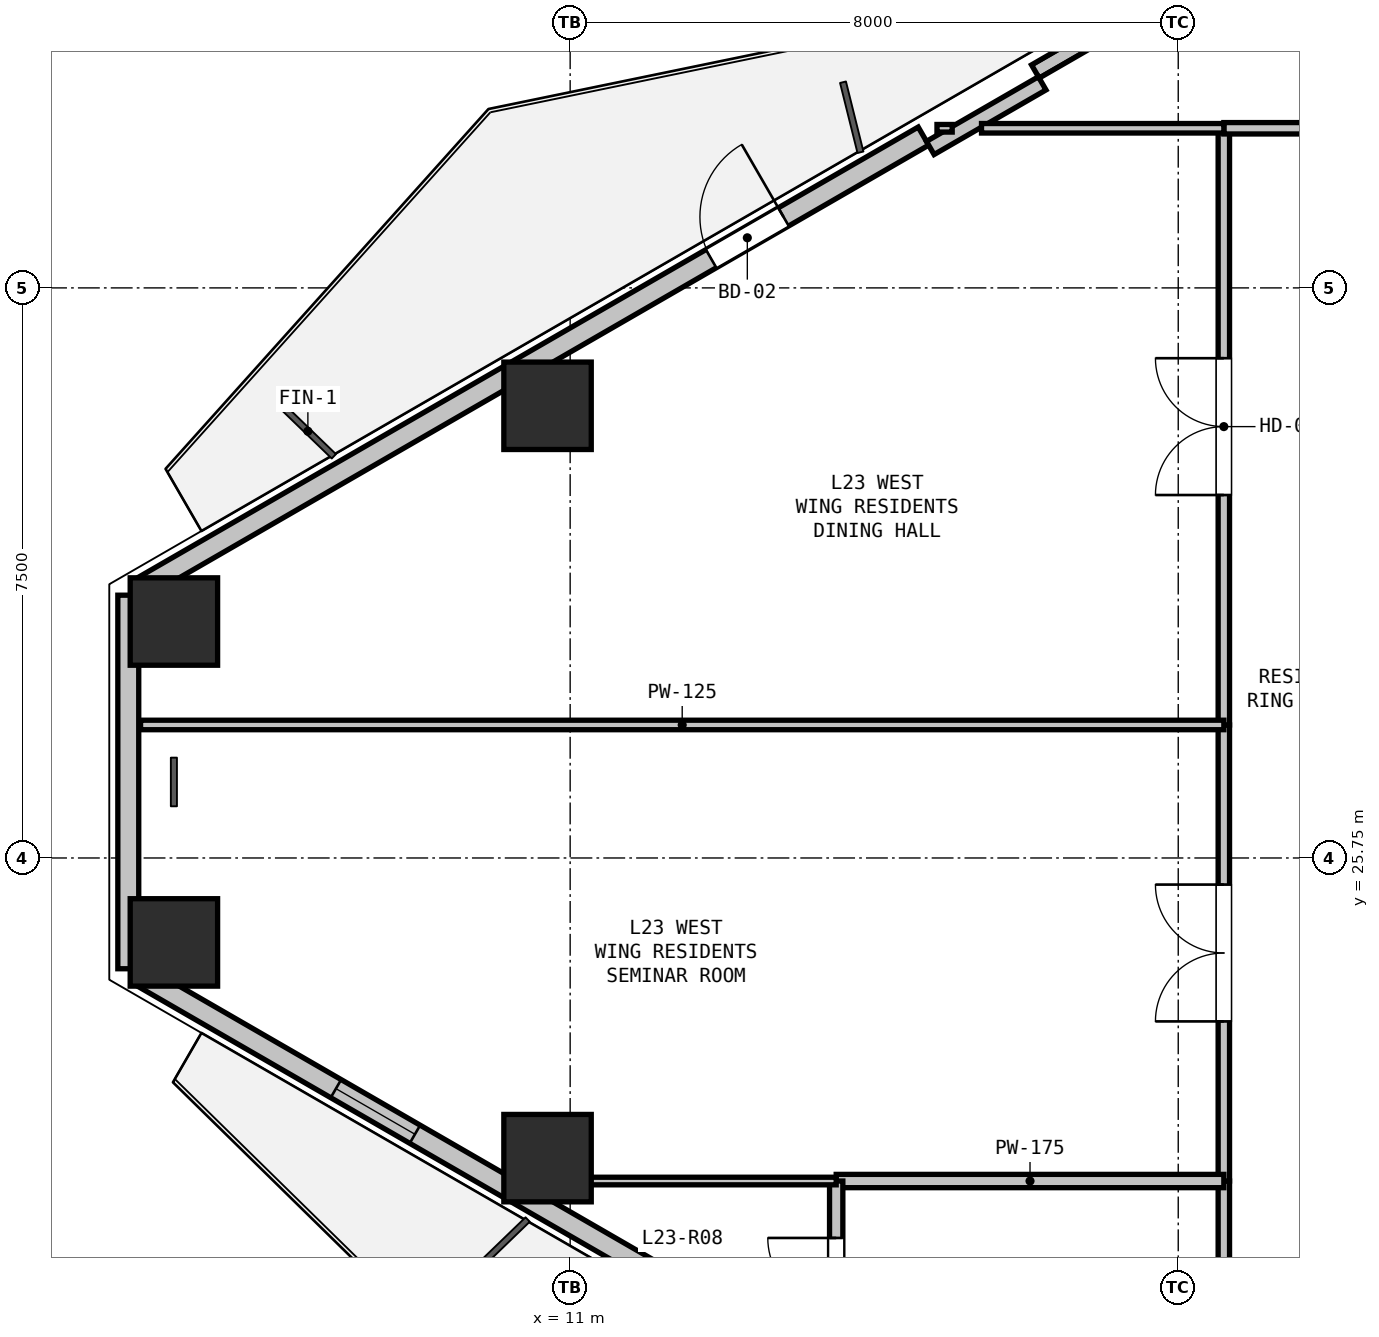
"""IFC4 building model, lengths in metres.
Left out: names, types, materials, properties, quantities, classifications, styles, units other than length and angle.
Written with IfcOpenShell. Run it as: python <this file> out.ifc"""

import sys

from ifc_helpers import new_model, si_unit, direction, frame, frame_2d, origin, origin_2d, place, context, subcontext, project, spatial, rectangle, hollow_rectangle, extrude, element, fill, save


model = new_model("IFC4")
c1 = context("Model", 3, precision=1e-05, world=origin(), true_north=direction((0.0, 1.0)))
c2 = subcontext(c1, "Body", "Model", "MODEL_VIEW")
j1 = project(units=[si_unit("LENGTHUNIT", "METRE"), si_unit("PLANEANGLEUNIT", "RADIAN")], contexts=[c1])
p1 = place(None, origin())
s1 = spatial("IfcSite", under=j1, at=p1, CompositionType="ELEMENT")
p2 = place(p1, origin())
s2 = spatial("IfcBuilding", under=s1, at=p2, CompositionType="ELEMENT")
p3 = place(p2, frame((0.0, 0.0, 86.7)))
s3 = spatial("IfcBuildingStorey", under=s2, at=p3, CompositionType="ELEMENT", Elevation=86.7)
for number, where, z_axis, x_axis in (
    (1, (5.787, 28.861, 0.0), (0.0, 0.0, 1.0), (1.0, 0.0, 0.0)),
    (2, (10.702, 31.699, 0.0), (0.0, 0.0, 1.0), (1.0, 0.0, 0.0)),
    (3, (10.702, 21.801, 0.0), (0.0, 0.0, 1.0), (1.0, 0.0, 0.0)),
    (4, (5.787, 24.639, 0.0), (0.0, 0.0, 1.0), (1.0, 0.0, 0.0)),
):
    element("IfcColumn", number, at=place(p3, frame(where, z_axis=z_axis, x_axis=x_axis)), inside=s3, PredefinedType="COLUMN", context=c2, shape_type="SweptSolid", body=[
        extrude(hollow_rectangle(XDim=1.15, YDim=1.15, WallThickness=0.032, at=origin_2d()), origin(), (0.0, 0.0, 1.0), 3.3),
    ])
p4 = place(p3, frame((5.187, 24.293, 0.0), z_axis=(0.0, 0.0, 1.0), x_axis=(0.0, 1.0, 0.0)))
e5 = element("IfcWall", 5, at=p4, inside=s3, PredefinedType="SOLIDWALL", context=c2, shape_type="SweptSolid", body=[
    extrude(rectangle(XDim=4.915, YDim=0.275, at=frame_2d((2.457, 0.0))), origin(), (0.0, 0.0, 1.0), 2.67),
])
p5 = place(p3, frame((5.317, 29.282, 0.0), z_axis=(0.0, 0.0, 1.0), x_axis=(0.866023023012, 0.500004123596, 0.0)))
e6 = element("IfcWall", 6, at=p5, inside=s3, PredefinedType="SOLIDWALL", context=c2, shape_type="SweptSolid", body=[
    extrude(rectangle(XDim=11.93, YDim=0.275, at=frame_2d((5.965, 0.0))), origin(), (0.0, 0.0, 1.0), 2.67),
])
p6 = place(p5, frame((8.704, 0.0, 0.0)))
e7 = element("IfcOpeningElement", 7, at=p6, cuts=e6, PredefinedType="OPENING", context=c2, shape_type="SweptSolid", body=[
    extrude(rectangle(XDim=1.1, YDim=2.1, at=frame_2d((0.55, 1.05))), frame((0.0, 0.147, 0.0), z_axis=(0.0, -1.0, 0.0), x_axis=(1.0, 0.0, 0.0)), (0.0, 0.0, 1.0), 0.295),
])
p7 = place(p3, frame((17.12, 36.097, 0.0), z_axis=(0.0, 0.0, 1.0), x_axis=(0.866027010039, 0.499997217876, 0.0)))
e8 = element("IfcWall", 8, at=p7, inside=s3, PredefinedType="PARAPET", context=c2, shape_type="SweptSolid", body=[
    extrude(rectangle(XDim=11.229, YDim=0.2, at=frame_2d((5.615, 0.0))), origin(), (0.0, 0.0, 1.0), 0.2),
])
p8 = place(p3, frame((15.738, 35.091, 0.0), z_axis=(0.0, 0.0, 1.0), x_axis=(0.866025371046, 0.500000056704, 0.0)))
e9 = element("IfcWall", 9, at=p8, inside=s3, PredefinedType="PARAPET", context=c2, shape_type="SweptSolid", body=[
    extrude(rectangle(XDim=1.7, YDim=0.2, at=frame_2d((0.85, 0.0))), origin(), (0.0, 0.0, 1.0), 2.67),
])
p9 = place(p3, frame((15.648, 18.253, 0.0), z_axis=(0.0, 0.0, 1.0), x_axis=(-0.866023023012, 0.500004123596, 0.0)))
e10 = element("IfcWall", 10, at=p9, inside=s3, PredefinedType="SOLIDWALL", context=c2, shape_type="SweptSolid", body=[
    extrude(rectangle(XDim=11.93, YDim=0.275, at=frame_2d((5.965, 0.0))), origin(), (0.0, 0.0, 1.0), 2.67),
])
p10 = place(p9, frame((7.725, 0.0, 0.9)))
e11 = element("IfcOpeningElement", 11, at=p10, cuts=e10, PredefinedType="OPENING", context=c2, shape_type="SweptSolid", body=[
    extrude(rectangle(XDim=1.2, YDim=1.5, at=frame_2d((0.6, 0.75))), frame((0.0, 0.147, 0.0), z_axis=(0.0, -1.0, 0.0), x_axis=(1.0, 0.0, 0.0)), (0.0, 0.0, 1.0), 0.295),
])
p11 = place(p3, frame((19.6, 18.15, 0.0), z_axis=(0.0, 0.0, 1.0), x_axis=(0.0, 1.0, 0.0)))
e12 = element("IfcWall", 12, at=p11, inside=s3, PredefinedType="PARTITIONING", context=c2, shape_type="SweptSolid", body=[
    extrude(rectangle(XDim=3.35, YDim=0.15, at=frame_2d((1.675, 0.0))), origin(), (0.0, 0.0, 1.0), 2.423),
])
p12 = place(p11, frame((1.25, 0.0, 0.0)))
e13 = element("IfcOpeningElement", 13, at=p12, cuts=e12, PredefinedType="OPENING", context=c2, shape_type="SweptSolid", body=[
    extrude(rectangle(XDim=0.85, YDim=2.1, at=frame_2d((0.425, 1.05))), frame((0.0, 0.085, 0.0), z_axis=(0.0, -1.0, 0.0), x_axis=(1.0, 0.0, 0.0)), (0.0, 0.0, 1.0), 0.17),
])
p13 = place(p3, frame((19.6, 21.5, 0.0), z_axis=(0.0, 0.0, 1.0), x_axis=(0.0, 1.0, 0.0)))
e14 = element("IfcWall", 14, at=p13, inside=s3, PredefinedType="PARTITIONING", context=c2, shape_type="SweptSolid", body=[
    extrude(rectangle(XDim=6.0, YDim=0.15, at=frame_2d((3.0, 0.0))), origin(), (0.0, 0.0, 1.0), 3.05),
])
p14 = place(p13, frame((2.1, 0.0, 0.0)))
e15 = element("IfcOpeningElement", 15, at=p14, cuts=e14, PredefinedType="OPENING", context=c2, shape_type="SweptSolid", body=[
    extrude(rectangle(XDim=1.8, YDim=2.2, at=frame_2d((0.9, 1.1))), frame((0.0, 0.085, 0.0), z_axis=(0.0, -1.0, 0.0), x_axis=(1.0, 0.0, 0.0)), (0.0, 0.0, 1.0), 0.17),
])
p15 = place(p3, frame((19.6, 27.5, 0.0), z_axis=(0.0, 0.0, 1.0), x_axis=(0.0, 1.0, 0.0)))
e16 = element("IfcWall", 16, at=p15, inside=s3, PredefinedType="PARTITIONING", context=c2, shape_type="SweptSolid", body=[
    extrude(rectangle(XDim=7.85, YDim=0.15, at=frame_2d((3.925, 0.0))), origin(), (0.0, 0.0, 1.0), 2.423),
])
p16 = place(p15, frame((3.025, 0.0, 0.0)))
e17 = element("IfcOpeningElement", 17, at=p16, cuts=e16, PredefinedType="OPENING", context=c2, shape_type="SweptSolid", body=[
    extrude(rectangle(XDim=1.8, YDim=2.2, at=frame_2d((0.9, 1.1))), frame((0.0, 0.085, 0.0), z_axis=(0.0, -1.0, 0.0), x_axis=(1.0, 0.0, 0.0)), (0.0, 0.0, 1.0), 0.17),
])
p17 = place(p3, frame((19.6, 35.35, 0.0), z_axis=(0.0, 0.0, 1.0), x_axis=(1.0, 0.0, 0.0)))
e18 = element("IfcWall", 18, at=p17, inside=s3, PredefinedType="PARTITIONING", context=c2, shape_type="SweptSolid", body=[
    extrude(rectangle(XDim=6.4, YDim=0.15, at=frame_2d((3.2, 0.0))), origin(), (0.0, 0.0, 1.0), 3.05),
])
p18 = place(p17, frame((2.966, 0.0, 0.0)))
e19 = element("IfcOpeningElement", 19, at=p18, cuts=e18, PredefinedType="OPENING", context=c2, shape_type="SweptSolid", body=[
    extrude(rectangle(XDim=1.8, YDim=2.2, at=frame_2d((0.9, 1.1))), frame((0.0, 0.085, 0.0), z_axis=(0.0, -1.0, 0.0), x_axis=(1.0, 0.0, 0.0)), (0.0, 0.0, 1.0), 0.17),
])
p19 = place(p3, frame((14.5, 21.5, 0.0), z_axis=(0.0, 0.0, 1.0), x_axis=(1.0, 0.0, 0.0)))
e20 = element("IfcWall", 20, at=p19, inside=s3, PredefinedType="PLUMBINGWALL", context=c2, shape_type="SweptSolid", body=[
    extrude(rectangle(XDim=5.1, YDim=0.175, at=frame_2d((2.55, 0.0))), origin(), (0.0, 0.0, 1.0), 2.423),
])
p20 = place(p3, frame((14.5, 19.102, 0.0), z_axis=(0.0, 0.0, 1.0), x_axis=(0.0, 1.0, 0.0)))
e21 = element("IfcWall", 21, at=p20, inside=s3, PredefinedType="PLUMBINGWALL", context=c2, shape_type="SweptSolid", body=[
    extrude(rectangle(XDim=2.398, YDim=0.175, at=frame_2d((1.199, 0.0))), origin(), (0.0, 0.0, 1.0), 2.365),
])
p21 = place(p20, frame((0.749, 0.0, 0.0)))
e22 = element("IfcOpeningElement", 22, at=p21, cuts=e21, PredefinedType="OPENING", context=c2, shape_type="SweptSolid", body=[
    extrude(rectangle(XDim=0.9, YDim=2.1, at=frame_2d((0.45, 1.05))), frame((0.0, 0.097, 0.0), z_axis=(0.0, -1.0, 0.0), x_axis=(1.0, 0.0, 0.0)), (0.0, 0.0, 1.0), 0.195),
])
p22 = place(p3, frame((19.6, 35.35, 0.0), z_axis=(0.0, 0.0, 1.0), x_axis=(-1.0, 0.0, 0.0)))
e23 = element("IfcWall", 23, at=p22, inside=s3, PredefinedType="PARTITIONING", context=c2, shape_type="SweptSolid", body=[
    extrude(rectangle(XDim=3.188, YDim=0.125, at=frame_2d((1.594, 0.0))), origin(), (0.0, 0.0, 1.0), 2.365),
])
p23 = place(p3, frame((16.026, 35.35, 0.0), z_axis=(0.0, 0.0, 1.0), x_axis=(-1.0, 0.0, 0.0)))
e24 = element("IfcWall", 24, at=p23, inside=s3, PredefinedType="PARTITIONING", context=c2, shape_type="SweptSolid", body=[
    extrude(rectangle(XDim=0.2, YDim=0.1, at=frame_2d((0.1, 0.0))), origin(), (0.0, 0.0, 1.0), 3.05),
])
p24 = place(p3, frame((19.6, 27.5, 0.0), z_axis=(0.0, 0.0, 1.0), x_axis=(-1.0, 0.0, 0.0)))
e25 = element("IfcWall", 25, at=p24, inside=s3, PredefinedType="PARTITIONING", context=c2, shape_type="SweptSolid", body=[
    extrude(rectangle(XDim=14.252, YDim=0.125, at=frame_2d((7.126, 0.0))), origin(), (0.0, 0.0, 1.0), 2.66),
])
p25 = place(p3, frame((14.5, 21.5, 0.0), z_axis=(0.0, 0.0, 1.0), x_axis=(-1.0, 0.0, 0.0)))
e26 = element("IfcWall", 26, at=p25, inside=s3, PredefinedType="PARTITIONING", context=c2, shape_type="SweptSolid", body=[
    extrude(rectangle(XDim=4.182, YDim=0.1, at=frame_2d((2.091, 0.0))), origin(), (0.0, 0.0, 1.0), 2.365),
])
p26 = place(p6, origin())
e27 = element("IfcDoor", 27, at=p26, inside=s3, OperationType="SINGLE_SWING_RIGHT", PredefinedType="DOOR", context=c2, shape_type="SweptSolid", body=[
    extrude(rectangle(XDim=1.1, YDim=2.1, at=frame_2d((0.55, 1.05))), frame((0.0, 0.025, 0.0), z_axis=(0.0, -1.0, 0.0), x_axis=(1.0, 0.0, 0.0)), (0.0, 0.0, 1.0), 0.05),
])
fill(e7, e27)
p27 = place(p10, origin())
e28 = element("IfcWindow", 28, at=p27, inside=s3, PartitioningType="SINGLE_PANEL", PredefinedType="WINDOW", context=c2, shape_type="SweptSolid", body=[
    extrude(rectangle(XDim=1.2, YDim=1.5, at=frame_2d((0.6, 0.75))), frame((0.0, 0.03, 0.0), z_axis=(0.0, -1.0, 0.0), x_axis=(1.0, 0.0, 0.0)), (0.0, 0.0, 1.0), 0.06),
])
fill(e11, e28)
p28 = place(p16, origin())
e29 = element("IfcDoor", 29, at=p28, inside=s3, OperationType="DOUBLE_DOOR_SINGLE_SWING", PredefinedType="DOOR", context=c2, shape_type="SweptSolid", body=[
    extrude(rectangle(XDim=1.8, YDim=2.2, at=frame_2d((0.9, 1.1))), frame((0.0, 0.025, 0.0), z_axis=(0.0, -1.0, 0.0), x_axis=(1.0, 0.0, 0.0)), (0.0, 0.0, 1.0), 0.05),
])
fill(e17, e29)
p29 = place(p14, origin())
e30 = element("IfcDoor", 30, at=p29, inside=s3, OperationType="DOUBLE_DOOR_SINGLE_SWING", PredefinedType="DOOR", context=c2, shape_type="SweptSolid", body=[
    extrude(rectangle(XDim=1.8, YDim=2.2, at=frame_2d((0.9, 1.1))), frame((0.0, 0.025, 0.0), z_axis=(0.0, -1.0, 0.0), x_axis=(1.0, 0.0, 0.0)), (0.0, 0.0, 1.0), 0.05),
])
fill(e15, e30)
p30 = place(p21, origin())
e31 = element("IfcDoor", 31, at=p30, inside=s3, OperationType="SINGLE_SWING_RIGHT", PredefinedType="DOOR", context=c2, shape_type="SweptSolid", body=[
    extrude(rectangle(XDim=0.9, YDim=2.1, at=frame_2d((0.45, 1.05))), frame((0.0, 0.025, 0.0), z_axis=(0.0, -1.0, 0.0), x_axis=(1.0, 0.0, 0.0)), (0.0, 0.0, 1.0), 0.05),
])
fill(e22, e31)
save(model, sys.argv[1])
